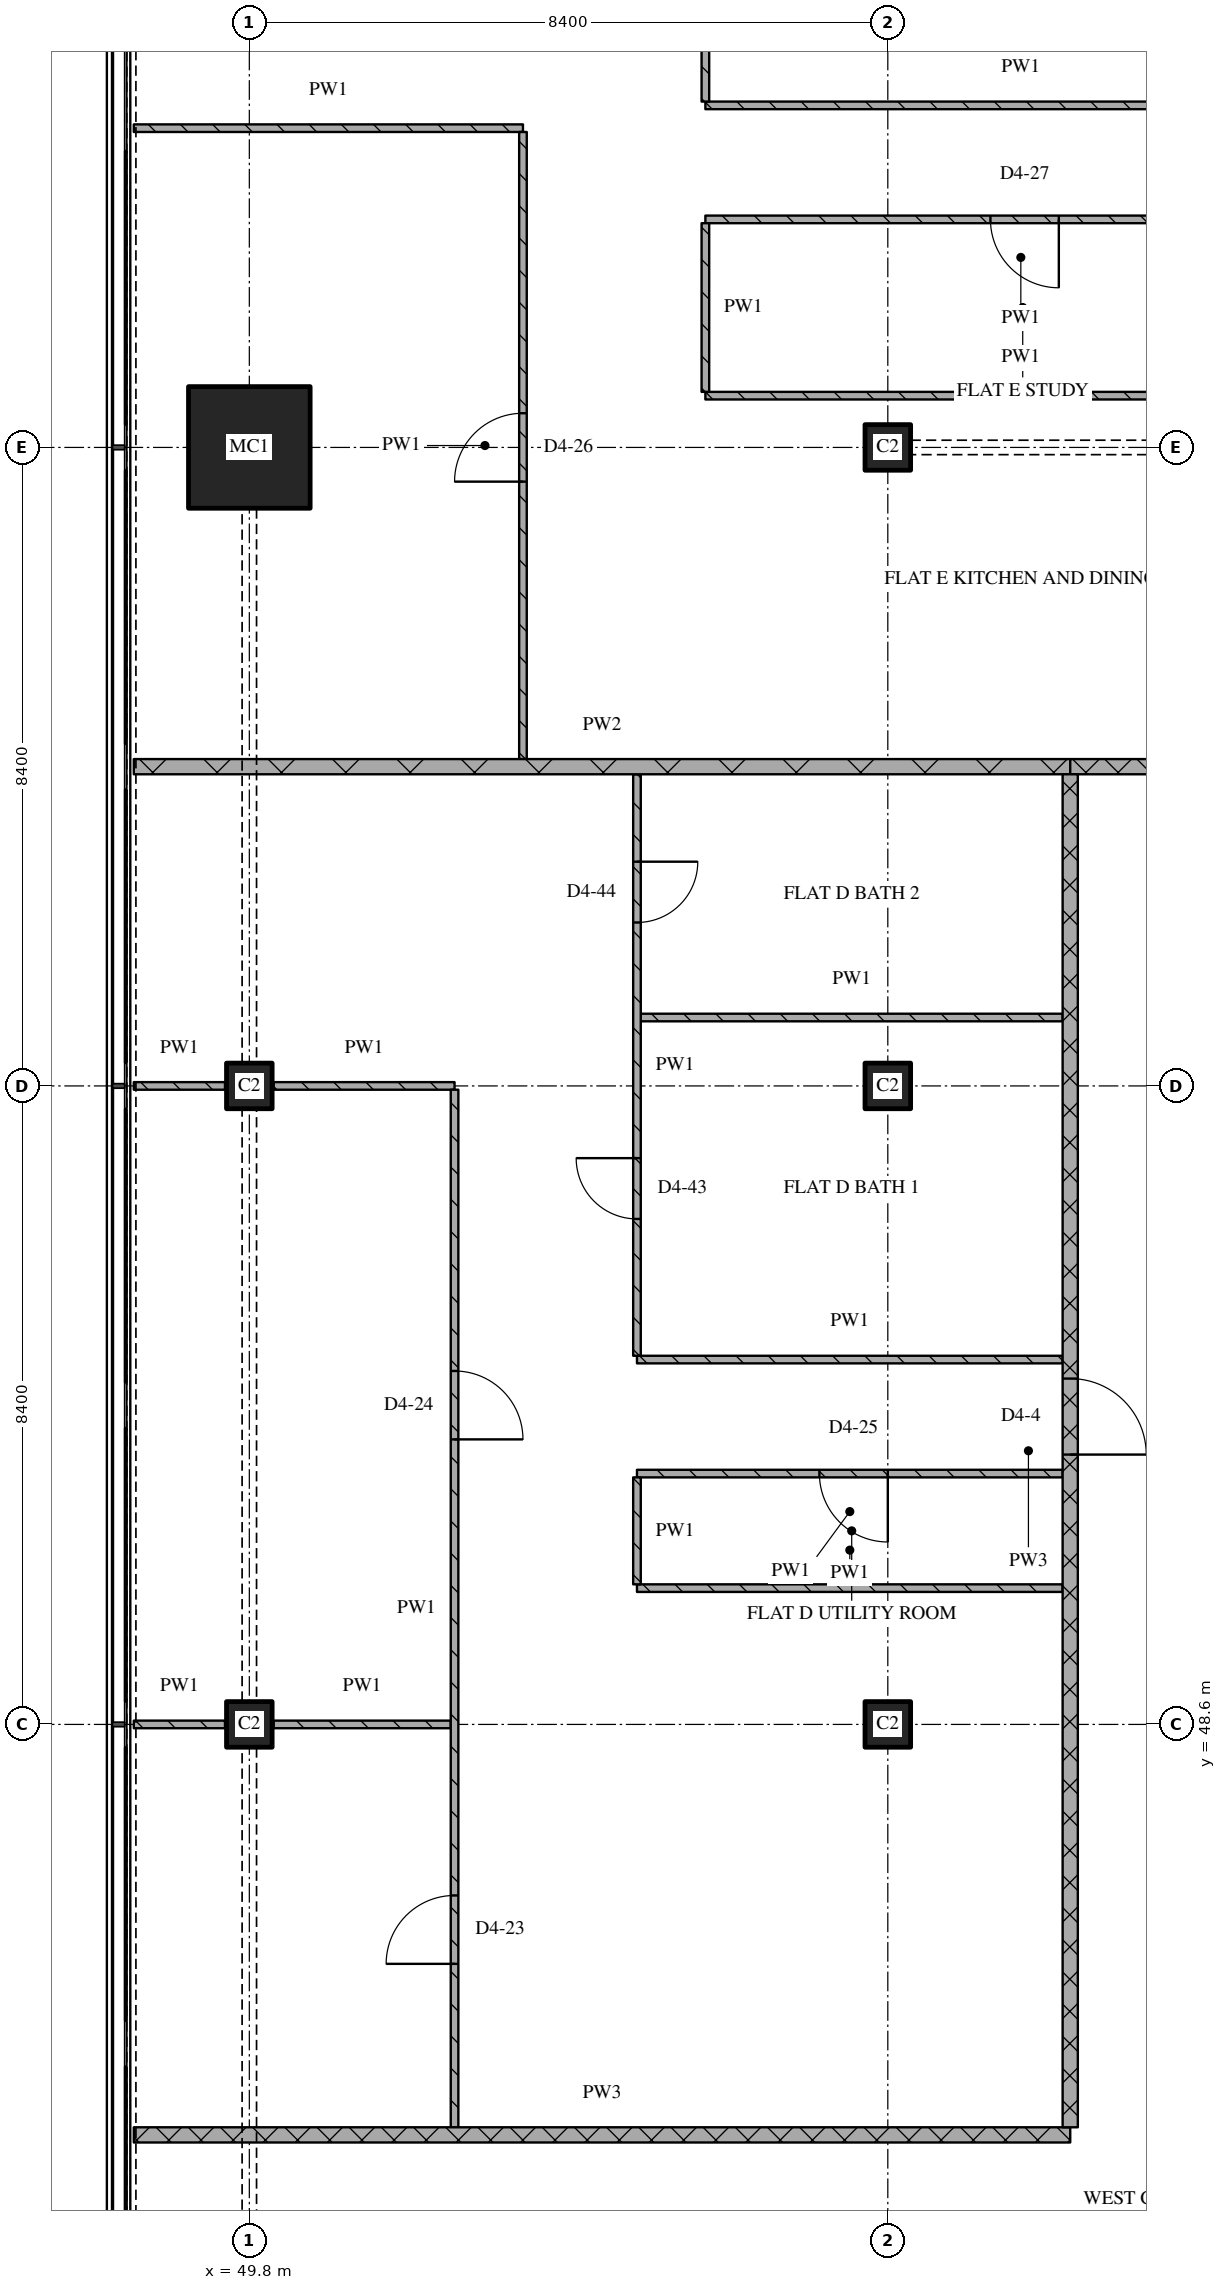
"""IFC4 building model, lengths in metres.
Left out: names, types, materials, properties, quantities, classifications, styles, units other than length and angle.
Written with IfcOpenShell. Run it as: python <this file> out.ifc"""

import sys

from ifc_helpers import new_model, si_unit, direction, frame, frame_2d, origin, origin_2d, place, context, subcontext, project, spatial, rectangle, extrude, element, fill, save


model = new_model("IFC4")
c1 = context("Model", 3, precision=1e-05, world=origin(), true_north=direction((0.0, 1.0)))
c2 = subcontext(c1, "Body", "Model", "MODEL_VIEW")
j1 = project(units=[si_unit("LENGTHUNIT", "METRE"), si_unit("PLANEANGLEUNIT", "RADIAN")], contexts=[c1])
p1 = place(None, origin())
s1 = spatial("IfcSite", under=j1, at=p1, CompositionType="ELEMENT")
p2 = place(p1, origin())
s2 = spatial("IfcBuilding", under=s1, at=p2, CompositionType="ELEMENT")
p3 = place(p2, frame((0.0, 0.0, 241.5)))
s3 = spatial("IfcBuildingStorey", under=s2, at=p3, CompositionType="ELEMENT", Elevation=241.5)
for number, where, z_axis, x_axis in (
    (1, (49.8, 48.6, 0.0), (0.0, 0.0, 1.0), (1.0, 0.0, 0.0)),
    (2, (49.8, 57.0, 0.0), (0.0, 0.0, 1.0), (1.0, 0.0, 0.0)),
):
    element("IfcColumn", number, at=place(p3, frame(where, z_axis=z_axis, x_axis=x_axis)), inside=s3, PredefinedType="COLUMN", context=c2, shape_type="SweptSolid", body=[
        extrude(rectangle(XDim=0.6, YDim=0.6, at=origin_2d()), origin(), (0.0, 0.0, 1.0), 3.6),
    ])
p4 = place(p3, frame((49.8, 65.4, 0.0), z_axis=(0.0, 0.0, 1.0), x_axis=(1.0, 0.0, 0.0)))
e3 = element("IfcColumn", 3, at=p4, inside=s3, PredefinedType="COLUMN", context=c2, shape_type="SweptSolid", body=[
    extrude(rectangle(XDim=1.6, YDim=1.6, at=origin_2d()), origin(), (0.0, 0.0, 1.0), 3.6),
])
for number, where, z_axis, x_axis in (
    (4, (58.2, 48.6, 0.0), (0.0, 0.0, 1.0), (1.0, 0.0, 0.0)),
    (5, (58.2, 57.0, 0.0), (0.0, 0.0, 1.0), (1.0, 0.0, 0.0)),
    (6, (58.2, 65.4, 0.0), (0.0, 0.0, 1.0), (1.0, 0.0, 0.0)),
):
    element("IfcColumn", number, at=place(p3, frame(where, z_axis=z_axis, x_axis=x_axis)), inside=s3, PredefinedType="COLUMN", context=c2, shape_type="SweptSolid", body=[
        extrude(rectangle(XDim=0.6, YDim=0.6, at=origin_2d()), origin(), (0.0, 0.0, 1.0), 3.6),
    ])
p5 = place(p3, frame((48.28, 43.2, 0.0), z_axis=(0.0, 0.0, 1.0), x_axis=(1.0, 0.0, 0.0)))
e7 = element("IfcWall", 7, at=p5, inside=s3, PredefinedType="PARTITIONING", context=c2, shape_type="SweptSolid", body=[
    extrude(rectangle(XDim=12.32, YDim=0.2, at=frame_2d((6.16, 0.0))), origin(), (0.0, 0.0, 1.0), 3.32),
])
p6 = place(p3, frame((48.28, 48.6, 0.0), z_axis=(0.0, 0.0, 1.0), x_axis=(1.0, 0.0, 0.0)))
e8 = element("IfcWall", 8, at=p6, inside=s3, PredefinedType="PARTITIONING", context=c2, shape_type="SweptSolid", body=[
    extrude(rectangle(XDim=1.2, YDim=0.1, at=frame_2d((0.6, 0.0))), origin(), (0.0, 0.0, 1.0), 3.32),
])
p7 = place(p3, frame((50.12, 48.6, 0.0), z_axis=(0.0, 0.0, 1.0), x_axis=(1.0, 0.0, 0.0)))
e9 = element("IfcWall", 9, at=p7, inside=s3, PredefinedType="PARTITIONING", context=c2, shape_type="SweptSolid", body=[
    extrude(rectangle(XDim=2.33, YDim=0.1, at=frame_2d((1.165, 0.0))), origin(), (0.0, 0.0, 1.0), 3.32),
])
p8 = place(p3, frame((54.9, 50.393, 0.0), z_axis=(0.0, 0.0, 1.0), x_axis=(1.0, 0.0, 0.0)))
e10 = element("IfcWall", 10, at=p8, inside=s3, PredefinedType="PARTITIONING", context=c2, shape_type="SweptSolid", body=[
    extrude(rectangle(XDim=5.6, YDim=0.1, at=frame_2d((2.8, 0.0))), origin(), (0.0, 0.0, 1.0), 3.32),
])
p9 = place(p3, frame((60.5, 51.9, 0.0), z_axis=(0.0, 0.0, 1.0), x_axis=(-1.0, 0.0, 0.0)))
e11 = element("IfcWall", 11, at=p9, inside=s3, PredefinedType="PARTITIONING", context=c2, shape_type="SweptSolid", body=[
    extrude(rectangle(XDim=5.6, YDim=0.1, at=frame_2d((2.8, 0.0))), origin(), (0.0, 0.0, 1.0), 3.32),
])
p10 = place(p9, frame((2.3, 0.0, 0.0)))
e12 = element("IfcOpeningElement", 12, at=p10, cuts=e11, PredefinedType="OPENING", context=c2, shape_type="SweptSolid", body=[
    extrude(rectangle(XDim=0.9, YDim=2.1, at=frame_2d((0.45, 1.05))), frame((0.0, 0.06, 0.0), z_axis=(0.0, -1.0, 0.0), x_axis=(1.0, 0.0, 0.0)), (0.0, 0.0, 1.0), 0.12),
])
p11 = place(p3, frame((54.9, 53.4, 0.0), z_axis=(0.0, 0.0, 1.0), x_axis=(1.0, 0.0, 0.0)))
e13 = element("IfcWall", 13, at=p11, inside=s3, PredefinedType="PARTITIONING", context=c2, shape_type="SweptSolid", body=[
    extrude(rectangle(XDim=5.6, YDim=0.1, at=frame_2d((2.8, 0.0))), origin(), (0.0, 0.0, 1.0), 3.32),
])
p12 = place(p3, frame((48.28, 57.0, 0.0), z_axis=(0.0, 0.0, 1.0), x_axis=(1.0, 0.0, 0.0)))
e14 = element("IfcWall", 14, at=p12, inside=s3, PredefinedType="PARTITIONING", context=c2, shape_type="SweptSolid", body=[
    extrude(rectangle(XDim=1.2, YDim=0.1, at=frame_2d((0.6, 0.0))), origin(), (0.0, 0.0, 1.0), 3.32),
])
p13 = place(p3, frame((50.12, 57.0, 0.0), z_axis=(0.0, 0.0, 1.0), x_axis=(1.0, 0.0, 0.0)))
e15 = element("IfcWall", 15, at=p13, inside=s3, PredefinedType="PARTITIONING", context=c2, shape_type="SweptSolid", body=[
    extrude(rectangle(XDim=2.38, YDim=0.1, at=frame_2d((1.19, 0.0))), origin(), (0.0, 0.0, 1.0), 3.32),
])
p14 = place(p3, frame((54.95, 57.9, 0.0), z_axis=(0.0, 0.0, 1.0), x_axis=(1.0, 0.0, 0.0)))
e16 = element("IfcWall", 16, at=p14, inside=s3, PredefinedType="PARTITIONING", context=c2, shape_type="SweptSolid", body=[
    extrude(rectangle(XDim=5.55, YDim=0.1, at=frame_2d((2.775, 0.0))), origin(), (0.0, 0.0, 1.0), 3.32),
])
p15 = place(p3, frame((60.6, 61.2, 0.0), z_axis=(0.0, 0.0, 1.0), x_axis=(1.0, 0.0, 0.0)))
e17 = element("IfcWall", 17, at=p15, inside=s3, PredefinedType="PARTITIONING", context=c2, shape_type="SweptSolid", body=[
    extrude(rectangle(XDim=3.6, YDim=0.2, at=frame_2d((1.8, 0.0))), origin(), (0.0, 0.0, 1.0), 3.32),
])
p16 = place(p3, frame((48.28, 61.2, 0.0), z_axis=(0.0, 0.0, 1.0), x_axis=(1.0, 0.0, 0.0)))
e18 = element("IfcWall", 18, at=p16, inside=s3, PredefinedType="PARTITIONING", context=c2, shape_type="SweptSolid", body=[
    extrude(rectangle(XDim=12.32, YDim=0.2, at=frame_2d((6.16, 0.0))), origin(), (0.0, 0.0, 1.0), 3.32),
])
p17 = place(p3, frame((55.8, 66.081, 0.0), z_axis=(0.0, 0.0, 1.0), x_axis=(1.0, 0.0, 0.0)))
e19 = element("IfcWall", 19, at=p17, inside=s3, PredefinedType="PARTITIONING", context=c2, shape_type="SweptSolid", body=[
    extrude(rectangle(XDim=8.3, YDim=0.1, at=frame_2d((4.15, 0.0))), origin(), (0.0, 0.0, 1.0), 3.32),
])
p18 = place(p3, frame((64.1, 68.4, 0.0), z_axis=(0.0, 0.0, 1.0), x_axis=(-1.0, 0.0, 0.0)))
e20 = element("IfcWall", 20, at=p18, inside=s3, PredefinedType="PARTITIONING", context=c2, shape_type="SweptSolid", body=[
    extrude(rectangle(XDim=8.3, YDim=0.1, at=frame_2d((4.15, 0.0))), origin(), (0.0, 0.0, 1.0), 3.32),
])
p19 = place(p18, frame((3.65, 0.0, 0.0)))
e21 = element("IfcOpeningElement", 21, at=p19, cuts=e20, PredefinedType="OPENING", context=c2, shape_type="SweptSolid", body=[
    extrude(rectangle(XDim=0.9, YDim=2.1, at=frame_2d((0.45, 1.05))), frame((0.0, 0.06, 0.0), z_axis=(0.0, -1.0, 0.0), x_axis=(1.0, 0.0, 0.0)), (0.0, 0.0, 1.0), 0.12),
])
p20 = place(p3, frame((48.28, 69.6, 0.0), z_axis=(0.0, 0.0, 1.0), x_axis=(1.0, 0.0, 0.0)))
e22 = element("IfcWall", 22, at=p20, inside=s3, PredefinedType="PARTITIONING", context=c2, shape_type="SweptSolid", body=[
    extrude(rectangle(XDim=5.12, YDim=0.1, at=frame_2d((2.56, 0.0))), origin(), (0.0, 0.0, 1.0), 3.32),
])
p21 = place(p3, frame((55.8, 69.9, 0.0), z_axis=(0.0, 0.0, 1.0), x_axis=(1.0, 0.0, 0.0)))
e23 = element("IfcWall", 23, at=p21, inside=s3, PredefinedType="PARTITIONING", context=c2, shape_type="SweptSolid", body=[
    extrude(rectangle(XDim=8.3, YDim=0.1, at=frame_2d((4.15, 0.0))), origin(), (0.0, 0.0, 1.0), 3.32),
])
p22 = place(p3, frame((52.5, 43.3, 0.0), z_axis=(0.0, 0.0, 1.0), x_axis=(0.0, 1.0, 0.0)))
e24 = element("IfcWall", 24, at=p22, inside=s3, PredefinedType="PARTITIONING", context=c2, shape_type="SweptSolid", body=[
    extrude(rectangle(XDim=13.65, YDim=0.1, at=frame_2d((6.825, 0.0))), origin(), (0.0, 0.0, 1.0), 3.32),
])
p23 = place(p22, frame((2.15, 0.0, 0.0)))
e25 = element("IfcOpeningElement", 25, at=p23, cuts=e24, PredefinedType="OPENING", context=c2, shape_type="SweptSolid", body=[
    extrude(rectangle(XDim=0.9, YDim=2.1, at=frame_2d((0.45, 1.05))), frame((0.0, 0.06, 0.0), z_axis=(0.0, -1.0, 0.0), x_axis=(1.0, 0.0, 0.0)), (0.0, 0.0, 1.0), 0.12),
])
p24 = place(p22, frame((9.05, 0.0, 0.0)))
e26 = element("IfcOpeningElement", 26, at=p24, cuts=e24, PredefinedType="OPENING", context=c2, shape_type="SweptSolid", body=[
    extrude(rectangle(XDim=0.9, YDim=2.1, at=frame_2d((0.45, 1.05))), frame((0.0, 0.06, 0.0), z_axis=(0.0, -1.0, 0.0), x_axis=(1.0, 0.0, 0.0)), (0.0, 0.0, 1.0), 0.12),
])
p25 = place(p3, frame((53.4, 61.3, 0.0), z_axis=(0.0, 0.0, 1.0), x_axis=(0.0, 1.0, 0.0)))
e27 = element("IfcWall", 27, at=p25, inside=s3, PredefinedType="PARTITIONING", context=c2, shape_type="SweptSolid", body=[
    extrude(rectangle(XDim=8.25, YDim=0.1, at=frame_2d((4.125, 0.0))), origin(), (0.0, 0.0, 1.0), 3.32),
])
p26 = place(p25, frame((3.65, 0.0, 0.0)))
e28 = element("IfcOpeningElement", 28, at=p26, cuts=e27, PredefinedType="OPENING", context=c2, shape_type="SweptSolid", body=[
    extrude(rectangle(XDim=0.9, YDim=2.1, at=frame_2d((0.45, 1.05))), frame((0.0, 0.06, 0.0), z_axis=(0.0, -1.0, 0.0), x_axis=(1.0, 0.0, 0.0)), (0.0, 0.0, 1.0), 0.12),
])
p27 = place(p3, frame((54.9, 51.85, 0.0), z_axis=(0.0, 0.0, 1.0), x_axis=(0.0, -1.0, 0.0)))
e29 = element("IfcWall", 29, at=p27, inside=s3, PredefinedType="PARTITIONING", context=c2, shape_type="SweptSolid", body=[
    extrude(rectangle(XDim=1.407, YDim=0.1, at=frame_2d((0.704, 0.0))), origin(), (0.0, 0.0, 1.0), 3.32),
])
p28 = place(p3, frame((54.9, 61.1, 0.0), z_axis=(0.0, 0.0, 1.0), x_axis=(0.0, -1.0, 0.0)))
e30 = element("IfcWall", 30, at=p28, inside=s3, PredefinedType="PARTITIONING", context=c2, shape_type="SweptSolid", body=[
    extrude(rectangle(XDim=7.65, YDim=0.1, at=frame_2d((3.825, 0.0))), origin(), (0.0, 0.0, 1.0), 3.32),
])
p29 = place(p28, frame((1.15, 0.0, 0.0)))
e31 = element("IfcOpeningElement", 31, at=p29, cuts=e30, PredefinedType="OPENING", context=c2, shape_type="SweptSolid", body=[
    extrude(rectangle(XDim=0.8, YDim=2.1, at=frame_2d((0.4, 1.05))), frame((0.0, 0.06, 0.0), z_axis=(0.0, -1.0, 0.0), x_axis=(1.0, 0.0, 0.0)), (0.0, 0.0, 1.0), 0.12),
])
p30 = place(p28, frame((5.05, 0.0, 0.0)))
e32 = element("IfcOpeningElement", 32, at=p30, cuts=e30, PredefinedType="OPENING", context=c2, shape_type="SweptSolid", body=[
    extrude(rectangle(XDim=0.8, YDim=2.1, at=frame_2d((0.4, 1.05))), frame((0.0, 0.06, 0.0), z_axis=(0.0, -1.0, 0.0), x_axis=(1.0, 0.0, 0.0)), (0.0, 0.0, 1.0), 0.12),
])
p31 = place(p3, frame((55.8, 68.35, 0.0), z_axis=(0.0, 0.0, 1.0), x_axis=(0.0, -1.0, 0.0)))
e33 = element("IfcWall", 33, at=p31, inside=s3, PredefinedType="PARTITIONING", context=c2, shape_type="SweptSolid", body=[
    extrude(rectangle(XDim=2.219, YDim=0.1, at=frame_2d((1.109, 0.0))), origin(), (0.0, 0.0, 1.0), 3.32),
])
p32 = place(p3, frame((55.8, 75.32, 0.0), z_axis=(0.0, 0.0, 1.0), x_axis=(0.0, -1.0, 0.0)))
e34 = element("IfcWall", 34, at=p32, inside=s3, PredefinedType="PARTITIONING", context=c2, shape_type="SweptSolid", body=[
    extrude(rectangle(XDim=5.37, YDim=0.1, at=frame_2d((2.685, 0.0))), origin(), (0.0, 0.0, 1.0), 3.32),
])
p33 = place(p32, frame((0.542, 0.0, 0.0)))
e35 = element("IfcOpeningElement", 35, at=p33, cuts=e34, PredefinedType="OPENING", context=c2, shape_type="SweptSolid", body=[
    extrude(rectangle(XDim=0.9, YDim=2.1, at=frame_2d((0.45, 1.05))), frame((0.0, 0.06, 0.0), z_axis=(0.0, -1.0, 0.0), x_axis=(1.0, 0.0, 0.0)), (0.0, 0.0, 1.0), 0.12),
])
p34 = place(p32, frame((3.443, 0.0, 0.0)))
e36 = element("IfcOpeningElement", 36, at=p34, cuts=e34, PredefinedType="OPENING", context=c2, shape_type="SweptSolid", body=[
    extrude(rectangle(XDim=0.8, YDim=2.1, at=frame_2d((0.4, 1.05))), frame((0.0, 0.06, 0.0), z_axis=(0.0, -1.0, 0.0), x_axis=(1.0, 0.0, 0.0)), (0.0, 0.0, 1.0), 0.12),
])
p35 = place(p3, frame((60.6, 43.3, 0.0), z_axis=(0.0, 0.0, 1.0), x_axis=(0.0, 1.0, 0.0)))
e37 = element("IfcWall", 37, at=p35, inside=s3, PredefinedType="PARTITIONING", context=c2, shape_type="SweptSolid", body=[
    extrude(rectangle(XDim=17.8, YDim=0.2, at=frame_2d((8.9, 0.0))), origin(), (0.0, 0.0, 1.0), 3.32),
])
p36 = place(p35, frame((8.85, 0.0, 0.0)))
e38 = element("IfcOpeningElement", 38, at=p36, cuts=e37, PredefinedType="OPENING", context=c2, shape_type="SweptSolid", body=[
    extrude(rectangle(XDim=1.0, YDim=2.1, at=frame_2d((0.5, 1.05))), frame((0.0, 0.11, 0.0), z_axis=(0.0, -1.0, 0.0), x_axis=(1.0, 0.0, 0.0)), (0.0, 0.0, 1.0), 0.22),
])
p37 = place(p10, origin())
e39 = element("IfcDoor", 39, at=p37, inside=s3, OperationType="SINGLE_SWING_LEFT", PredefinedType="DOOR", context=c2, shape_type="SweptSolid", body=[
    extrude(rectangle(XDim=0.9, YDim=2.1, at=frame_2d((0.45, 1.05))), frame((0.0, 0.025, 0.0), z_axis=(0.0, -1.0, 0.0), x_axis=(1.0, 0.0, 0.0)), (0.0, 0.0, 1.0), 0.05),
])
fill(e12, e39)
p38 = place(p19, origin())
e40 = element("IfcDoor", 40, at=p38, inside=s3, OperationType="SINGLE_SWING_LEFT", PredefinedType="DOOR", context=c2, shape_type="SweptSolid", body=[
    extrude(rectangle(XDim=0.9, YDim=2.1, at=frame_2d((0.45, 1.05))), frame((0.0, 0.025, 0.0), z_axis=(0.0, -1.0, 0.0), x_axis=(1.0, 0.0, 0.0)), (0.0, 0.0, 1.0), 0.05),
])
fill(e21, e40)
p39 = place(p23, origin())
e41 = element("IfcDoor", 41, at=p39, inside=s3, OperationType="SINGLE_SWING_LEFT", PredefinedType="DOOR", context=c2, shape_type="SweptSolid", body=[
    extrude(rectangle(XDim=0.9, YDim=2.1, at=frame_2d((0.45, 1.05))), frame((0.0, 0.025, 0.0), z_axis=(0.0, -1.0, 0.0), x_axis=(1.0, 0.0, 0.0)), (0.0, 0.0, 1.0), 0.05),
])
fill(e25, e41)
p40 = place(p24, origin())
e42 = element("IfcDoor", 42, at=p40, inside=s3, OperationType="SINGLE_SWING_RIGHT", PredefinedType="DOOR", context=c2, shape_type="SweptSolid", body=[
    extrude(rectangle(XDim=0.9, YDim=2.1, at=frame_2d((0.45, 1.05))), frame((0.0, 0.025, 0.0), z_axis=(0.0, -1.0, 0.0), x_axis=(1.0, 0.0, 0.0)), (0.0, 0.0, 1.0), 0.05),
])
fill(e26, e42)
p41 = place(p26, origin())
e43 = element("IfcDoor", 43, at=p41, inside=s3, OperationType="SINGLE_SWING_LEFT", PredefinedType="DOOR", context=c2, shape_type="SweptSolid", body=[
    extrude(rectangle(XDim=0.9, YDim=2.1, at=frame_2d((0.45, 1.05))), frame((0.0, 0.025, 0.0), z_axis=(0.0, -1.0, 0.0), x_axis=(1.0, 0.0, 0.0)), (0.0, 0.0, 1.0), 0.05),
])
fill(e28, e43)
p42 = place(p29, origin())
e44 = element("IfcDoor", 44, at=p42, inside=s3, OperationType="SINGLE_SWING_LEFT", PredefinedType="DOOR", context=c2, shape_type="SweptSolid", body=[
    extrude(rectangle(XDim=0.8, YDim=2.1, at=frame_2d((0.4, 1.05))), frame((0.0, 0.025, 0.0), z_axis=(0.0, -1.0, 0.0), x_axis=(1.0, 0.0, 0.0)), (0.0, 0.0, 1.0), 0.05),
])
fill(e31, e44)
p43 = place(p30, origin())
e45 = element("IfcDoor", 45, at=p43, inside=s3, OperationType="SINGLE_SWING_RIGHT", PredefinedType="DOOR", context=c2, shape_type="SweptSolid", body=[
    extrude(rectangle(XDim=0.8, YDim=2.1, at=frame_2d((0.4, 1.05))), frame((0.0, 0.025, 0.0), z_axis=(0.0, -1.0, 0.0), x_axis=(1.0, 0.0, 0.0)), (0.0, 0.0, 1.0), 0.05),
])
fill(e32, e45)
p44 = place(p36, origin())
e46 = element("IfcDoor", 46, at=p44, inside=s3, OperationType="SINGLE_SWING_RIGHT", PredefinedType="DOOR", context=c2, shape_type="SweptSolid", body=[
    extrude(rectangle(XDim=1.0, YDim=2.1, at=frame_2d((0.5, 1.05))), frame((0.0, 0.025, 0.0), z_axis=(0.0, -1.0, 0.0), x_axis=(1.0, 0.0, 0.0)), (0.0, 0.0, 1.0), 0.05),
])
fill(e38, e46)
save(model, sys.argv[1])
